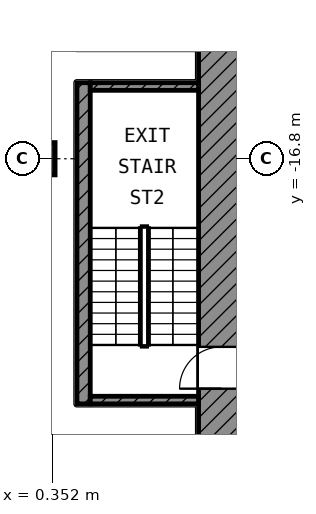
"""IFC4 building model, lengths in metres.
Left out: names, types, materials, properties, quantities, classifications, styles, units other than length and angle.
Written with IfcOpenShell. Run it as: python <this file> out.ifc"""

import sys

from ifc_helpers import new_model, si_unit, direction, frame, frame_2d, origin, origin_2d, place, context, subcontext, project, spatial, rectangle, extrude, element, fill, save


model = new_model("IFC4")
c1 = context("Model", 3, precision=1e-05, world=origin(), true_north=direction((0.0, 1.0)))
c2 = subcontext(c1, "Body", "Model", "MODEL_VIEW")
j1 = project(units=[si_unit("LENGTHUNIT", "METRE"), si_unit("PLANEANGLEUNIT", "RADIAN")], contexts=[c1])
p1 = place(None, origin())
s1 = spatial("IfcSite", under=j1, at=p1, CompositionType="ELEMENT")
p2 = place(p1, origin())
s2 = spatial("IfcBuilding", under=s1, at=p2, CompositionType="ELEMENT")
p3 = place(p2, frame((0.0, 0.0, 239.0)))
s3 = spatial("IfcBuildingStorey", under=s2, at=p3, CompositionType="ELEMENT", Elevation=239.0)
p4 = place(p3, frame((0.0, -16.8, 0.0), z_axis=(0.0, 0.0, 1.0), x_axis=(1.0, 0.0, 0.0)))
e1 = element("IfcColumn", 1, at=p4, inside=s3, PredefinedType="COLUMN", context=c2, shape_type="SweptSolid", body=[
    extrude(rectangle(XDim=0.85, YDim=0.85, at=origin_2d()), origin(), (0.0, 0.0, 1.0), 4.2),
])
p5 = place(p3, frame((4.8, -24.8, 0.0), z_axis=(0.0, 0.0, 1.0), x_axis=(0.0, 1.0, 0.0)))
e2 = element("IfcWall", 2, at=p5, inside=s3, PredefinedType="SHEAR", context=c2, shape_type="SweptSolid", body=[
    extrude(rectangle(XDim=19.4, YDim=1.2, at=frame_2d((9.7, 0.0))), origin(), (0.0, 0.0, 1.0), 3.6),
])
p6 = place(p5, frame((11.25, 0.0, 0.0)))
e3 = element("IfcOpeningElement", 3, at=p6, cuts=e2, PredefinedType="OPENING", context=c2, shape_type="SweptSolid", body=[
    extrude(rectangle(XDim=1.1, YDim=2.1, at=frame_2d((0.55, 1.05))), frame((0.0, 0.61, 0.0), z_axis=(0.0, -1.0, 0.0), x_axis=(1.0, 0.0, 0.0)), (0.0, 0.0, 1.0), 1.22),
])
p7 = place(p5, frame((1.95, 0.0, 0.0)))
e4 = element("IfcOpeningElement", 4, at=p7, cuts=e2, PredefinedType="OPENING", context=c2, shape_type="SweptSolid", body=[
    extrude(rectangle(XDim=1.1, YDim=2.1, at=frame_2d((0.55, 1.05))), frame((0.0, 0.61, 0.0), z_axis=(0.0, -1.0, 0.0), x_axis=(1.0, 0.0, 0.0)), (0.0, 0.0, 1.0), 1.22),
])
p8 = place(p3, frame((1.175, -23.25, 0.0), z_axis=(0.0, 0.0, 1.0), x_axis=(0.0, 1.0, 0.0)))
e5 = element("IfcWall", 5, at=p8, inside=s3, PredefinedType="SHEAR", context=c2, shape_type="SweptSolid", body=[
    extrude(rectangle(XDim=8.45, YDim=0.35, at=frame_2d((4.225, 0.0))), origin(), (0.0, 0.0, 1.0), 3.6),
])
for number, where, z_axis, x_axis in (
    (6, (1.35, -14.9, 0.0), (0.0, 0.0, 1.0), (1.0, 0.0, 0.0)),
    (7, (1.35, -23.15, 0.0), (0.0, 0.0, 1.0), (1.0, 0.0, 0.0)),
):
    element("IfcWall", number, at=place(p3, frame(where, z_axis=z_axis, x_axis=x_axis)), inside=s3, PredefinedType="SHEAR", context=c2, shape_type="SweptSolid", body=[
        extrude(rectangle(XDim=2.85, YDim=0.2, at=frame_2d((1.425, 0.0))), origin(), (0.0, 0.0, 1.0), 3.6),
    ])
p9 = place(p7, origin())
e8 = element("IfcDoor", 8, at=p9, inside=s3, OperationType="SINGLE_SWING_LEFT", PredefinedType="DOOR", context=c2, shape_type="SweptSolid", body=[
    extrude(rectangle(XDim=1.1, YDim=2.1, at=frame_2d((0.55, 1.05))), frame((0.0, 0.025, 0.0), z_axis=(0.0, -1.0, 0.0), x_axis=(1.0, 0.0, 0.0)), (0.0, 0.0, 1.0), 0.05),
])
fill(e4, e8)
save(model, sys.argv[1])
